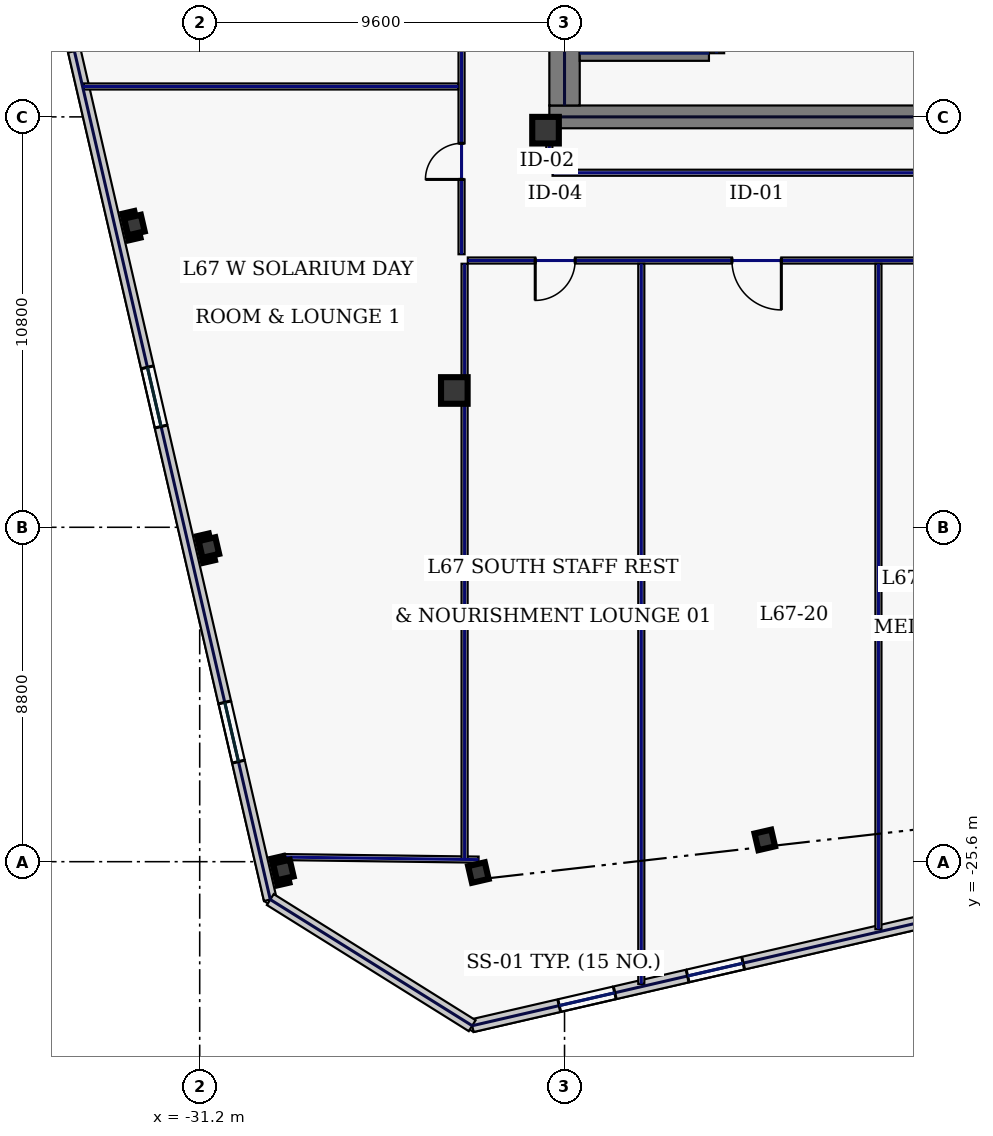
"""IFC4 building model, lengths in metres.
Left out: names, types, materials, properties, quantities, classifications, styles, units other than length and angle.
Written with IfcOpenShell. Run it as: python <this file> out.ifc"""

import sys

from ifc_helpers import new_model, si_unit, direction, frame, frame_2d, origin, origin_2d, place, context, subcontext, project, spatial, rectangle, hollow_rectangle, extrude, element, fill, save


model = new_model("IFC4")
c1 = context("Model", 3, precision=1e-05, world=origin(), true_north=direction((0.0, 1.0)))
c2 = subcontext(c1, "Body", "Model", "MODEL_VIEW")
j1 = project(units=[si_unit("LENGTHUNIT", "METRE"), si_unit("PLANEANGLEUNIT", "RADIAN")], contexts=[c1])
p1 = place(None, origin())
s1 = spatial("IfcSite", under=j1, at=p1, CompositionType="ELEMENT")
p2 = place(p1, origin())
s2 = spatial("IfcBuilding", under=s1, at=p2, CompositionType="ELEMENT")
p3 = place(p2, frame((0.0, 0.0, 289.0)))
s3 = spatial("IfcBuildingStorey", under=s2, at=p3, CompositionType="ELEMENT", Elevation=289.0)
p4 = place(p3, frame((-22.0, -6.0, 0.0), z_axis=(0.0, 0.0, 1.0), x_axis=(1.0, 0.0, 0.0)))
e1 = element("IfcWall", 1, at=p4, inside=s3, PredefinedType="SHEAR", context=c2, shape_type="SweptSolid", body=[
    extrude(rectangle(XDim=11.5, YDim=0.6, at=frame_2d((5.75, 0.0))), origin(), (0.0, 0.0, 1.0), 3.74),
])
p5 = place(p3, frame((-21.6, -5.7, 0.0), z_axis=(0.0, 0.0, 1.0), x_axis=(0.0, 1.0, 0.0)))
e2 = element("IfcWall", 2, at=p5, inside=s3, PredefinedType="SHEAR", context=c2, shape_type="SweptSolid", body=[
    extrude(rectangle(XDim=11.4, YDim=0.8, at=frame_2d((5.7, 0.0))), origin(), (0.0, 0.0, 1.0), 3.74),
])
p6 = place(p3, frame((-17.6, -4.325, 0.0), z_axis=(0.0, 0.0, 1.0), x_axis=(0.0, 1.0, 0.0)))
e3 = element("IfcWall", 3, at=p6, inside=s3, PredefinedType="SHEAR", context=c2, shape_type="SweptSolid", body=[
    extrude(rectangle(XDim=8.65, YDim=0.4, at=frame_2d((4.325, 0.0))), origin(), (0.0, 0.0, 1.0), 3.74),
])
p7 = place(p6, frame((0.25, 0.0, 0.0)))
e4 = element("IfcOpeningElement", 4, at=p7, cuts=e3, PredefinedType="OPENING", context=c2, shape_type="SweptSolid", body=[
    extrude(rectangle(XDim=1.1, YDim=2.2, at=frame_2d((0.55, 1.1))), frame((0.0, 0.21, 0.0), z_axis=(0.0, -1.0, 0.0), x_axis=(1.0, 0.0, 0.0)), (0.0, 0.0, 1.0), 0.42),
])
p8 = place(p3, frame((-21.2, -4.325, 0.0), z_axis=(0.0, 0.0, 1.0), x_axis=(1.0, 0.0, 0.0)))
e5 = element("IfcWall", 5, at=p8, inside=s3, PredefinedType="SHEAR", context=c2, shape_type="SweptSolid", body=[
    extrude(rectangle(XDim=3.4, YDim=0.4, at=frame_2d((1.7, 0.0))), origin(), (0.0, 0.0, 1.0), 3.74),
])
for number, where, z_axis, x_axis in (
    (6, (-22.1, -6.35, 0.0), (0.0, 0.0, 1.0), (1.0, 0.0, 0.0)),
    (7, (-24.5, -13.2, 0.0), (0.0, 0.0, 1.0), (1.0, 0.0, 0.0)),
):
    element("IfcColumn", number, at=place(p3, frame(where, z_axis=z_axis, x_axis=x_axis)), inside=s3, PredefinedType="COLUMN", context=c2, shape_type="SweptSolid", body=[
        extrude(hollow_rectangle(XDim=0.7, YDim=0.7, WallThickness=0.032, at=origin_2d()), origin(), (0.0, 0.0, 1.0), 3.74),
    ])
for number, where, z_axis, x_axis in (
    (8, (-23.867, -25.886, 0.0), (0.0, 0.0, 1.0), (0.974, 0.225, 0.0)),
    (9, (-16.33, -25.027, 0.0), (0.0, 0.0, 1.0), (0.974, 0.225, 0.0)),
    (10, (-32.917, -8.845, 0.0), (0.0, 0.0, 1.0), (0.974, 0.225, 0.0)),
    (11, (-30.958, -17.332, 0.0), (0.0, 0.0, 1.0), (0.974, 0.225, 0.0)),
    (12, (-28.999, -25.819, 0.0), (0.0, 0.0, 1.0), (0.974, 0.225, 0.0)),
):
    element("IfcColumn", number, at=place(p3, frame(where, z_axis=z_axis, x_axis=x_axis)), inside=s3, PredefinedType="COLUMN", context=c2, shape_type="SweptSolid", body=[
        extrude(hollow_rectangle(XDim=0.45, YDim=0.45, WallThickness=0.022, at=origin_2d()), origin(), (0.0, 0.0, 1.0), 3.74),
    ])
p9 = place(p3, frame((-24.03, -29.916, 0.0), z_axis=(0.0, 0.0, 1.0), x_axis=(0.974370978061, 0.224947098473, 0.0)))
e13 = element("IfcWall", 13, at=p9, inside=s3, PredefinedType="STANDARD", context=c2, shape_type="SweptSolid", body=[
    extrude(rectangle(XDim=17.506, YDim=0.34, at=frame_2d((8.753, 0.0))), origin(), (0.0, 0.0, 1.0), 3.74),
])
p10 = place(p9, frame((2.35, 0.0, 0.9)))
e14 = element("IfcOpeningElement", 14, at=p10, cuts=e13, PredefinedType="OPENING", context=c2, shape_type="SweptSolid", body=[
    extrude(rectangle(XDim=1.5, YDim=2.0, at=frame_2d((0.75, 1.0))), frame((0.0, 0.18, 0.0), z_axis=(0.0, -1.0, 0.0), x_axis=(1.0, 0.0, 0.0)), (0.0, 0.0, 1.0), 0.36),
])
p11 = place(p9, frame((5.817, 0.0, 0.9)))
e15 = element("IfcOpeningElement", 15, at=p11, cuts=e13, PredefinedType="OPENING", context=c2, shape_type="SweptSolid", body=[
    extrude(rectangle(XDim=1.5, YDim=2.0, at=frame_2d((0.75, 1.0))), frame((0.0, 0.18, 0.0), z_axis=(0.0, -1.0, 0.0), x_axis=(1.0, 0.0, 0.0)), (0.0, 0.0, 1.0), 0.36),
])
p12 = place(p9, frame((13.353, 0.0, 0.9)))
e16 = element("IfcOpeningElement", 16, at=p12, cuts=e13, PredefinedType="OPENING", context=c2, shape_type="SweptSolid", body=[
    extrude(rectangle(XDim=1.5, YDim=2.0, at=frame_2d((0.75, 1.0))), frame((0.0, 0.18, 0.0), z_axis=(0.0, -1.0, 0.0), x_axis=(1.0, 0.0, 0.0)), (0.0, 0.0, 1.0), 0.36),
])
p13 = place(p3, frame((-37.486, 8.676, 0.0), z_axis=(0.0, 0.0, 1.0), x_axis=(0.224953091034, -0.974369594576, 0.0)))
e17 = element("IfcWall", 17, at=p13, inside=s3, PredefinedType="STANDARD", context=c2, shape_type="SweptSolid", body=[
    extrude(rectangle(XDim=36.2, YDim=0.34, at=frame_2d((18.1, 0.0))), origin(), (0.0, 0.0, 1.0), 3.74),
])
p14 = place(p13, frame((4.825, 0.0, 0.75)))
e18 = element("IfcOpeningElement", 18, at=p14, cuts=e17, PredefinedType="OPENING", context=c2, shape_type="SweptSolid", body=[
    extrude(rectangle(XDim=0.85, YDim=1.85, at=frame_2d((0.425, 0.925))), frame((0.0, 0.18, 0.0), z_axis=(0.0, -1.0, 0.0), x_axis=(1.0, 0.0, 0.0)), (0.0, 0.0, 1.0), 0.36),
])
p15 = place(p13, frame((12.425, 0.0, 0.75)))
e19 = element("IfcOpeningElement", 19, at=p15, cuts=e17, PredefinedType="OPENING", context=c2, shape_type="SweptSolid", body=[
    extrude(rectangle(XDim=0.85, YDim=1.85, at=frame_2d((0.425, 0.925))), frame((0.0, 0.18, 0.0), z_axis=(0.0, -1.0, 0.0), x_axis=(1.0, 0.0, 0.0)), (0.0, 0.0, 1.0), 0.36),
])
p16 = place(p13, frame((21.825, 0.0, 0.58)))
e20 = element("IfcOpeningElement", 20, at=p16, cuts=e17, PredefinedType="OPENING", context=c2, shape_type="SweptSolid", body=[
    extrude(rectangle(XDim=1.6, YDim=2.3, at=frame_2d((0.8, 1.15))), frame((0.0, 0.18, 0.0), z_axis=(0.0, -1.0, 0.0), x_axis=(1.0, 0.0, 0.0)), (0.0, 0.0, 1.0), 0.36),
])
p17 = place(p13, frame((30.875, 0.0, 0.58)))
e21 = element("IfcOpeningElement", 21, at=p17, cuts=e17, PredefinedType="OPENING", context=c2, shape_type="SweptSolid", body=[
    extrude(rectangle(XDim=1.6, YDim=2.3, at=frame_2d((0.8, 1.15))), frame((0.0, 0.18, 0.0), z_axis=(0.0, -1.0, 0.0), x_axis=(1.0, 0.0, 0.0)), (0.0, 0.0, 1.0), 0.36),
])
p18 = place(p3, frame((-29.343, -26.596, 0.0), z_axis=(0.0, 0.0, 1.0), x_axis=(0.848037708252, -0.529935887993, 0.0)))
e22 = element("IfcWall", 22, at=p18, inside=s3, PredefinedType="STANDARD", context=c2, shape_type="SweptSolid", body=[
    extrude(rectangle(XDim=6.265, YDim=0.34, at=frame_2d((3.133, 0.0))), origin(), (0.0, 0.0, 1.0), 3.74),
])
p19 = place(p3, frame((-28.994, -25.479, 0.0), z_axis=(0.0, 0.0, 1.0), x_axis=(0.999915052546, -0.01303409726, 0.0)))
e23 = element("IfcWall", 23, at=p19, inside=s3, PredefinedType="PARTITIONING", context=c2, shape_type="SweptSolid", body=[
    extrude(rectangle(XDim=5.132, YDim=0.16, at=frame_2d((2.566, 0.0))), origin(), (0.0, 0.0, 1.0), 3.74),
])
p20 = place(p3, frame((-24.31, -9.615, 0.0), z_axis=(0.0, 0.0, 1.0), x_axis=(0.0, 1.0, 0.0)))
e24 = element("IfcWall", 24, at=p20, inside=s3, PredefinedType="PARTITIONING", context=c2, shape_type="SweptSolid", body=[
    extrude(rectangle(XDim=19.28, YDim=0.16, at=frame_2d((9.64, 0.0))), origin(), (0.0, 0.0, 1.0), 3.74),
])
p21 = place(p20, frame((1.969, 0.0, 0.0)))
e25 = element("IfcOpeningElement", 25, at=p21, cuts=e24, PredefinedType="OPENING", context=c2, shape_type="SweptSolid", body=[
    extrude(rectangle(XDim=0.95, YDim=2.2, at=frame_2d((0.475, 1.1))), frame((0.0, 0.09, 0.0), z_axis=(0.0, -1.0, 0.0), x_axis=(1.0, 0.0, 0.0)), (0.0, 0.0, 1.0), 0.18),
])
p22 = place(p20, frame((6.625, 0.0, 0.0)))
e26 = element("IfcOpeningElement", 26, at=p22, cuts=e24, PredefinedType="OPENING", context=c2, shape_type="SweptSolid", body=[
    extrude(rectangle(XDim=0.95, YDim=2.2, at=frame_2d((0.475, 1.1))), frame((0.0, 0.09, 0.0), z_axis=(0.0, -1.0, 0.0), x_axis=(1.0, 0.0, 0.0)), (0.0, 0.0, 1.0), 0.18),
])
p23 = place(p20, frame((11.825, 0.0, 0.0)))
e27 = element("IfcOpeningElement", 27, at=p23, cuts=e24, PredefinedType="OPENING", context=c2, shape_type="SweptSolid", body=[
    extrude(rectangle(XDim=0.95, YDim=2.2, at=frame_2d((0.475, 1.1))), frame((0.0, 0.09, 0.0), z_axis=(0.0, -1.0, 0.0), x_axis=(1.0, 0.0, 0.0)), (0.0, 0.0, 1.0), 0.18),
])
p24 = place(p20, frame((16.506, 0.0, 0.0)))
e28 = element("IfcOpeningElement", 28, at=p24, cuts=e24, PredefinedType="OPENING", context=c2, shape_type="SweptSolid", body=[
    extrude(rectangle(XDim=0.95, YDim=2.2, at=frame_2d((0.475, 1.1))), frame((0.0, 0.09, 0.0), z_axis=(0.0, -1.0, 0.0), x_axis=(1.0, 0.0, 0.0)), (0.0, 0.0, 1.0), 0.18),
])
p25 = place(p3, frame((12.535, -9.78, 0.0), z_axis=(0.0, 0.0, 1.0), x_axis=(-1.0, 0.0, 0.0)))
e29 = element("IfcWall", 29, at=p25, inside=s3, PredefinedType="PARTITIONING", context=c2, shape_type="SweptSolid", body=[
    extrude(rectangle(XDim=36.68, YDim=0.16, at=frame_2d((18.34, 0.0))), origin(), (0.0, 0.0, 1.0), 3.74),
])
p26 = place(p25, frame((33.856, 0.0, 0.0)))
e30 = element("IfcOpeningElement", 30, at=p26, cuts=e29, PredefinedType="OPENING", context=c2, shape_type="SweptSolid", body=[
    extrude(rectangle(XDim=1.05, YDim=2.2, at=frame_2d((0.525, 1.1))), frame((0.0, 0.09, 0.0), z_axis=(0.0, -1.0, 0.0), x_axis=(1.0, 0.0, 0.0)), (0.0, 0.0, 1.0), 0.18),
])
p27 = place(p25, frame((28.43, 0.0, 0.0)))
e31 = element("IfcOpeningElement", 31, at=p27, cuts=e29, PredefinedType="OPENING", context=c2, shape_type="SweptSolid", body=[
    extrude(rectangle(XDim=1.3, YDim=2.2, at=frame_2d((0.65, 1.1))), frame((0.0, 0.09, 0.0), z_axis=(0.0, -1.0, 0.0), x_axis=(1.0, 0.0, 0.0)), (0.0, 0.0, 1.0), 0.18),
])
p28 = place(p25, frame((22.64, 0.0, 0.0)))
e32 = element("IfcOpeningElement", 32, at=p28, cuts=e29, PredefinedType="OPENING", context=c2, shape_type="SweptSolid", body=[
    extrude(rectangle(XDim=1.3, YDim=2.2, at=frame_2d((0.65, 1.1))), frame((0.0, 0.09, 0.0), z_axis=(0.0, -1.0, 0.0), x_axis=(1.0, 0.0, 0.0)), (0.0, 0.0, 1.0), 0.18),
])
p29 = place(p25, frame((16.44, 0.0, 0.0)))
e33 = element("IfcOpeningElement", 33, at=p29, cuts=e29, PredefinedType="OPENING", context=c2, shape_type="SweptSolid", body=[
    extrude(rectangle(XDim=1.3, YDim=2.2, at=frame_2d((0.65, 1.1))), frame((0.0, 0.09, 0.0), z_axis=(0.0, -1.0, 0.0), x_axis=(1.0, 0.0, 0.0)), (0.0, 0.0, 1.0), 0.18),
])
p30 = place(p25, frame((9.385, 0.0, 0.0)))
e34 = element("IfcOpeningElement", 34, at=p30, cuts=e29, PredefinedType="OPENING", context=c2, shape_type="SweptSolid", body=[
    extrude(rectangle(XDim=0.95, YDim=2.2, at=frame_2d((0.475, 1.1))), frame((0.0, 0.09, 0.0), z_axis=(0.0, -1.0, 0.0), x_axis=(1.0, 0.0, 0.0)), (0.0, 0.0, 1.0), 0.18),
])
p31 = place(p25, frame((2.799, 0.0, 0.0)))
e35 = element("IfcOpeningElement", 35, at=p31, cuts=e29, PredefinedType="OPENING", context=c2, shape_type="SweptSolid", body=[
    extrude(rectangle(XDim=1.05, YDim=2.2, at=frame_2d((0.525, 1.1))), frame((0.0, 0.09, 0.0), z_axis=(0.0, -1.0, 0.0), x_axis=(1.0, 0.0, 0.0)), (0.0, 0.0, 1.0), 0.18),
])
p32 = place(p3, frame((-22.0, -6.42, 0.0), z_axis=(0.0, 0.0, 1.0), x_axis=(0.0, -1.0, 0.0)))
e36 = element("IfcWall", 36, at=p32, inside=s3, PredefinedType="PARTITIONING", context=c2, shape_type="SweptSolid", body=[
    extrude(rectangle(XDim=0.965, YDim=0.16, at=frame_2d((0.482, 0.0))), origin(), (0.0, 0.0, 1.0), 3.74),
])
p33 = place(p3, frame((-21.915, -7.47, 0.0), z_axis=(0.0, 0.0, 1.0), x_axis=(1.0, 0.0, 0.0)))
e37 = element("IfcWall", 37, at=p33, inside=s3, PredefinedType="PARTITIONING", context=c2, shape_type="SweptSolid", body=[
    extrude(rectangle(XDim=11.2, YDim=0.16, at=frame_2d((5.6, 0.0))), origin(), (0.0, 0.0, 1.0), 3.74),
])
p34 = place(p3, frame((-24.23, -25.536, 0.0), z_axis=(0.0, 0.0, 1.0), x_axis=(0.0, 1.0, 0.0)))
e38 = element("IfcWall", 38, at=p34, inside=s3, PredefinedType="PARTITIONING", context=c2, shape_type="SweptSolid", body=[
    extrude(rectangle(XDim=15.671, YDim=0.16, at=frame_2d((7.835, 0.0))), origin(), (0.0, 0.0, 1.0), 3.335),
])
p35 = place(p3, frame((-19.58, -28.817, 0.0), z_axis=(0.0, 0.0, 1.0), x_axis=(0.0, 1.0, 0.0)))
e39 = element("IfcWall", 39, at=p35, inside=s3, PredefinedType="PARTITIONING", context=c2, shape_type="SweptSolid", body=[
    extrude(rectangle(XDim=18.952, YDim=0.16, at=frame_2d((9.476, 0.0))), origin(), (0.0, 0.0, 1.0), 3.74),
])
p36 = place(p3, frame((-13.34, -27.376, 0.0), z_axis=(0.0, 0.0, 1.0), x_axis=(0.0, 1.0, 0.0)))
e40 = element("IfcWall", 40, at=p36, inside=s3, PredefinedType="PARTITIONING", context=c2, shape_type="SweptSolid", body=[
    extrude(rectangle(XDim=17.511, YDim=0.16, at=frame_2d((8.756, 0.0))), origin(), (0.0, 0.0, 1.0), 3.74),
])
p37 = place(p3, frame((-34.262, -5.2, 0.0), z_axis=(0.0, 0.0, 1.0), x_axis=(1.0, 0.0, 0.0)))
e41 = element("IfcWall", 41, at=p37, inside=s3, PredefinedType="PARTITIONING", context=c2, shape_type="SweptSolid", body=[
    extrude(rectangle(XDim=9.867, YDim=0.16, at=frame_2d((4.933, 0.0))), origin(), (0.0, 0.0, 1.0), 3.74),
])
p38 = place(p10, origin())
e42 = element("IfcWindow", 42, at=p38, inside=s3, PartitioningType="SINGLE_PANEL", PredefinedType="WINDOW", context=c2, shape_type="SweptSolid", body=[
    extrude(rectangle(XDim=1.5, YDim=2.0, at=frame_2d((0.75, 1.0))), frame((0.0, 0.03, 0.0), z_axis=(0.0, -1.0, 0.0), x_axis=(1.0, 0.0, 0.0)), (0.0, 0.0, 1.0), 0.06),
])
fill(e14, e42)
p39 = place(p11, origin())
e43 = element("IfcWindow", 43, at=p39, inside=s3, PartitioningType="SINGLE_PANEL", PredefinedType="WINDOW", context=c2, shape_type="SweptSolid", body=[
    extrude(rectangle(XDim=1.5, YDim=2.0, at=frame_2d((0.75, 1.0))), frame((0.0, 0.03, 0.0), z_axis=(0.0, -1.0, 0.0), x_axis=(1.0, 0.0, 0.0)), (0.0, 0.0, 1.0), 0.06),
])
fill(e15, e43)
p40 = place(p16, origin())
e44 = element("IfcWindow", 44, at=p40, inside=s3, PartitioningType="SINGLE_PANEL", PredefinedType="WINDOW", context=c2, shape_type="SweptSolid", body=[
    extrude(rectangle(XDim=1.6, YDim=2.3, at=frame_2d((0.8, 1.15))), frame((0.0, 0.03, 0.0), z_axis=(0.0, -1.0, 0.0), x_axis=(1.0, 0.0, 0.0)), (0.0, 0.0, 1.0), 0.06),
])
fill(e20, e44)
p41 = place(p17, origin())
e45 = element("IfcWindow", 45, at=p41, inside=s3, PartitioningType="SINGLE_PANEL", PredefinedType="WINDOW", context=c2, shape_type="SweptSolid", body=[
    extrude(rectangle(XDim=1.6, YDim=2.3, at=frame_2d((0.8, 1.15))), frame((0.0, 0.03, 0.0), z_axis=(0.0, -1.0, 0.0), x_axis=(1.0, 0.0, 0.0)), (0.0, 0.0, 1.0), 0.06),
])
fill(e21, e45)
p42 = place(p26, origin())
e46 = element("IfcDoor", 46, at=p42, inside=s3, OperationType="SINGLE_SWING_RIGHT", PredefinedType="DOOR", context=c2, shape_type="SweptSolid", body=[
    extrude(rectangle(XDim=1.05, YDim=2.2, at=frame_2d((0.525, 1.1))), frame((0.0, 0.025, 0.0), z_axis=(0.0, -1.0, 0.0), x_axis=(1.0, 0.0, 0.0)), (0.0, 0.0, 1.0), 0.05),
])
fill(e30, e46)
p43 = place(p27, origin())
e47 = element("IfcDoor", 47, at=p43, inside=s3, OperationType="SINGLE_SWING_LEFT", PredefinedType="DOOR", context=c2, shape_type="SweptSolid", body=[
    extrude(rectangle(XDim=1.3, YDim=2.2, at=frame_2d((0.65, 1.1))), frame((0.0, 0.025, 0.0), z_axis=(0.0, -1.0, 0.0), x_axis=(1.0, 0.0, 0.0)), (0.0, 0.0, 1.0), 0.05),
])
fill(e31, e47)
p44 = place(p21, origin())
e48 = element("IfcDoor", 48, at=p44, inside=s3, OperationType="SINGLE_SWING_LEFT", PredefinedType="DOOR", context=c2, shape_type="SweptSolid", body=[
    extrude(rectangle(XDim=0.95, YDim=2.2, at=frame_2d((0.475, 1.1))), frame((0.0, 0.025, 0.0), z_axis=(0.0, -1.0, 0.0), x_axis=(1.0, 0.0, 0.0)), (0.0, 0.0, 1.0), 0.05),
])
fill(e25, e48)
save(model, sys.argv[1])
